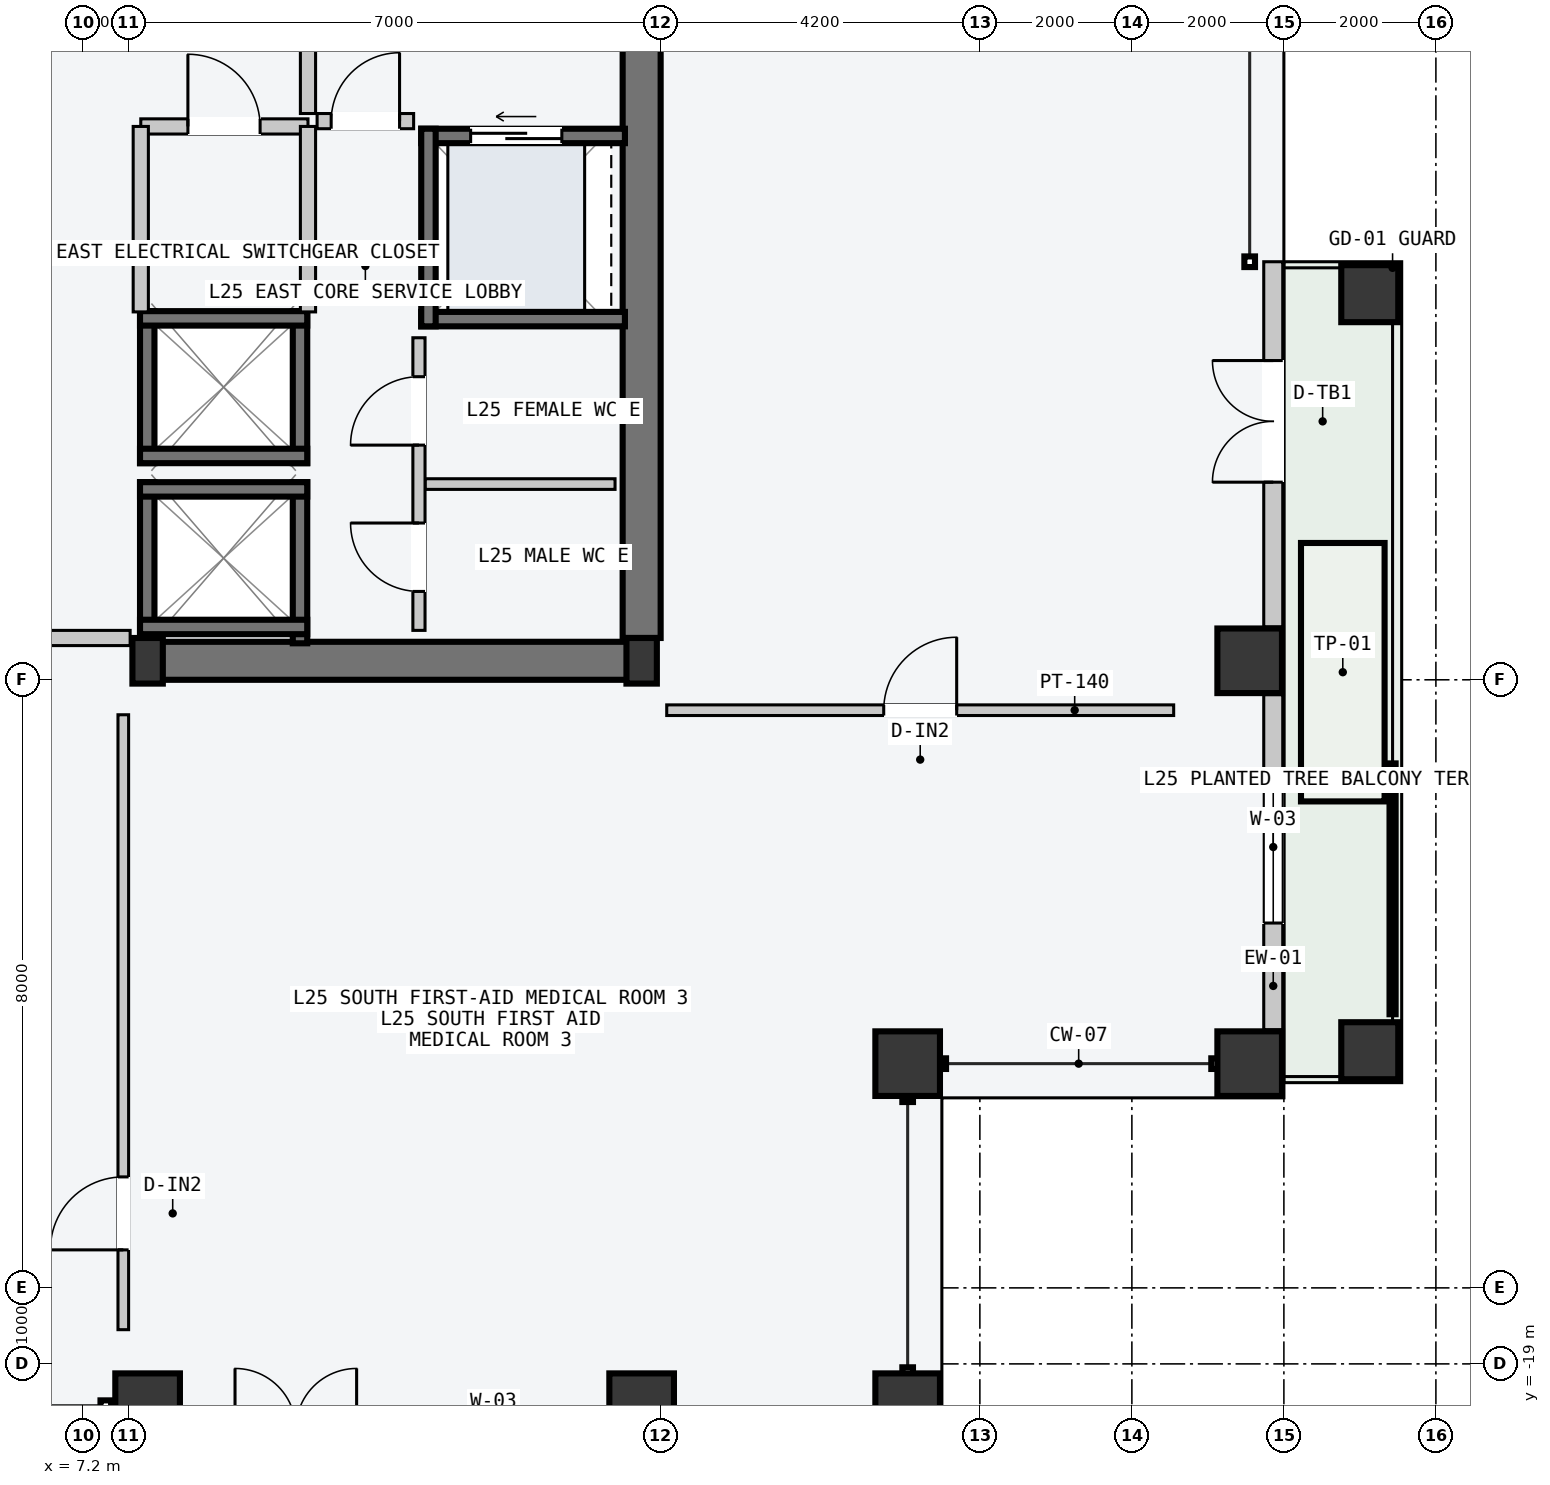
"""IFC4 building model, lengths in metres.
Left out: names, types, materials, properties, quantities, classifications, styles, units other than length and angle.
Written with IfcOpenShell. Run it as: python <this file> out.ifc"""

import sys

from ifc_helpers import new_model, si_unit, direction, frame, frame_2d, origin, origin_2d, place, context, subcontext, project, spatial, rectangle, hollow_rectangle, i_section, extrude, element, fill, save


model = new_model("IFC4")
c1 = context("Model", 3, precision=1e-05, world=origin(), true_north=direction((0.0, 1.0)))
c2 = subcontext(c1, "Body", "Model", "MODEL_VIEW")
j1 = project(units=[si_unit("LENGTHUNIT", "METRE"), si_unit("PLANEANGLEUNIT", "RADIAN")], contexts=[c1])
p1 = place(None, origin())
s1 = spatial("IfcSite", under=j1, at=p1, CompositionType="ELEMENT")
p2 = place(p1, origin())
s2 = spatial("IfcBuilding", under=s1, at=p2, CompositionType="ELEMENT")
p3 = place(p2, frame((0.0, 0.0, 99.0)))
s3 = spatial("IfcBuildingStorey", under=s2, at=p3, CompositionType="ELEMENT", Elevation=99.0)
p4 = place(p3, frame((8.07, -9.75, -0.2), z_axis=(0.0, 0.0, 1.0), x_axis=(1.0, 0.0, 0.0)))
e1 = element("IfcWall", 1, at=p4, inside=s3, PredefinedType="SHEAR", context=c2, shape_type="SweptSolid", body=[
    extrude(rectangle(XDim=6.46, YDim=0.5, at=frame_2d((3.23, 0.0))), origin(), (0.0, 0.0, 1.0), 3.6),
])
p5 = place(p3, frame((14.55, -9.45, -0.2), z_axis=(0.0, 0.0, 1.0), x_axis=(0.0, 1.0, 0.0)))
e2 = element("IfcWall", 2, at=p5, inside=s3, PredefinedType="SHEAR", context=c2, shape_type="SweptSolid", body=[
    extrude(rectangle(XDim=9.15, YDim=0.5, at=frame_2d((4.575, 0.0))), origin(), (0.0, 0.0, 1.0), 3.6),
])
for number, where, z_axis, x_axis in (
    (3, (8.05, -9.75, 0.0), (0.0, 0.0, 1.0), (1.0, 0.0, 0.0)),
    (4, (14.55, -9.75, 0.0), (0.0, 0.0, 1.0), (1.0, 0.0, 0.0)),
):
    element("IfcColumn", number, at=place(p3, frame(where, z_axis=z_axis, x_axis=x_axis)), inside=s3, PredefinedType="COLUMN", context=c2, shape_type="SweptSolid", body=[
        extrude(i_section(OverallWidth=0.4, OverallDepth=0.6, WebThickness=0.022, FlangeThickness=0.036, at=origin_2d()), origin(), (0.0, 0.0, 1.0), 3.6),
    ])
for number, where, z_axis, x_axis in (
    (5, (8.05, -19.55, 0.0), (0.0, 0.0, 1.0), (1.0, 0.0, 0.0)),
    (6, (14.55, -19.55, 0.0), (0.0, 0.0, 1.0), (1.0, 0.0, 0.0)),
    (7, (18.05, -19.55, 0.0), (0.0, 0.0, 1.0), (1.0, 0.0, 0.0)),
    (8, (22.55, -15.05, 0.0), (0.0, 0.0, 1.0), (0.0, 1.0, 0.0)),
    (9, (22.55, -9.75, 0.0), (0.0, 0.0, 1.0), (0.0, 1.0, 0.0)),
    (10, (18.05, -15.05, 0.0), (0.0, 0.0, 1.0), (1.0, 0.0, 0.0)),
):
    element("IfcColumn", number, at=place(p3, frame(where, z_axis=z_axis, x_axis=x_axis)), inside=s3, PredefinedType="COLUMN", context=c2, shape_type="SweptSolid", body=[
        extrude(hollow_rectangle(XDim=0.85, YDim=0.85, WallThickness=0.04, at=origin_2d()), origin(), (0.0, 0.0, 1.0), 3.6),
    ])
for number, where, z_axis, x_axis in (
    (11, (24.13, -14.88, 0.0), (0.0, 0.0, 1.0), (0.0, 1.0, 0.0)),
    (12, (24.13, -4.92, 0.0), (0.0, 0.0, 1.0), (0.0, 1.0, 0.0)),
):
    element("IfcColumn", number, at=place(p3, frame(where, z_axis=z_axis, x_axis=x_axis)), inside=s3, PredefinedType="COLUMN", context=c2, shape_type="SweptSolid", body=[
        extrude(hollow_rectangle(XDim=0.75, YDim=0.75, WallThickness=0.032, at=origin_2d()), origin(), (0.0, 0.0, 1.0), 3.6),
    ])
p6 = place(p3, frame((22.86, -14.605, 0.0), z_axis=(0.0, 0.0, 1.0), x_axis=(0.0, 1.0, 0.0)))
e13 = element("IfcWall", 13, at=p6, inside=s3, PredefinedType="STANDARD", context=c2, shape_type="SweptSolid", body=[
    extrude(rectangle(XDim=4.41, YDim=0.25, at=frame_2d((2.205, 0.0))), origin(), (0.0, 0.0, 1.0), 3.4),
])
p7 = place(p6, frame((1.405, 0.0, 0.85)))
e14 = element("IfcOpeningElement", 14, at=p7, cuts=e13, PredefinedType="OPENING", context=c2, shape_type="SweptSolid", body=[
    extrude(rectangle(XDim=2.0, YDim=2.1, at=frame_2d((1.0, 1.05))), frame((0.0, 0.135, 0.0), z_axis=(0.0, -1.0, 0.0), x_axis=(1.0, 0.0, 0.0)), (0.0, 0.0, 1.0), 0.27),
])
p8 = place(p3, frame((22.86, -9.305, 0.0), z_axis=(0.0, 0.0, 1.0), x_axis=(0.0, 1.0, 0.0)))
e15 = element("IfcWall", 15, at=p8, inside=s3, PredefinedType="STANDARD", context=c2, shape_type="SweptSolid", body=[
    extrude(rectangle(XDim=4.805, YDim=0.25, at=frame_2d((2.402, 0.0))), origin(), (0.0, 0.0, 1.0), 3.4),
])
p9 = place(p8, frame((1.905, 0.0, 0.0)))
e16 = element("IfcOpeningElement", 16, at=p9, cuts=e15, PredefinedType="OPENING", context=c2, shape_type="SweptSolid", body=[
    extrude(rectangle(XDim=1.6, YDim=2.2, at=frame_2d((0.8, 1.1))), frame((0.0, 0.135, 0.0), z_axis=(0.0, -1.0, 0.0), x_axis=(1.0, 0.0, 0.0)), (0.0, 0.0, 1.0), 0.27),
])
for number, where, z_axis, x_axis in (
    (17, (8.045, -9.52, -0.2), (0.0, 0.0, 1.0), (0.0, 1.0, 0.0)),
    (18, (10.055, -9.52, -0.2), (0.0, 0.0, 1.0), (0.0, 1.0, 0.0)),
):
    element("IfcWall", number, at=place(p3, frame(where, z_axis=z_axis, x_axis=x_axis)), inside=s3, PredefinedType="SOLIDWALL", context=c2, shape_type="SweptSolid", body=[
        extrude(rectangle(XDim=2.12, YDim=0.19, at=frame_2d((1.06, 0.0))), origin(), (0.0, 0.0, 1.0), 3.6),
    ])
for number, where, z_axis, x_axis in (
    (19, (7.95, -7.495, -0.2), (0.0, 0.0, 1.0), (1.0, 0.0, 0.0)),
    (20, (7.95, -9.305, -0.2), (0.0, 0.0, 1.0), (1.0, 0.0, 0.0)),
):
    element("IfcWall", number, at=place(p3, frame(where, z_axis=z_axis, x_axis=x_axis)), inside=s3, PredefinedType="SOLIDWALL", context=c2, shape_type="SweptSolid", body=[
        extrude(rectangle(XDim=2.2, YDim=0.19, at=frame_2d((1.1, 0.0))), origin(), (0.0, 0.0, 1.0), 3.6),
    ])
for number, where, z_axis, x_axis in (
    (21, (8.045, -7.15, -0.2), (0.0, 0.0, 1.0), (0.0, 1.0, 0.0)),
    (22, (10.055, -7.15, -0.2), (0.0, 0.0, 1.0), (0.0, 1.0, 0.0)),
):
    element("IfcWall", number, at=place(p3, frame(where, z_axis=z_axis, x_axis=x_axis)), inside=s3, PredefinedType="SOLIDWALL", context=c2, shape_type="SweptSolid", body=[
        extrude(rectangle(XDim=2.0, YDim=0.19, at=frame_2d((1.0, 0.0))), origin(), (0.0, 0.0, 1.0), 3.6),
    ])
for number, where, z_axis, x_axis in (
    (23, (7.95, -5.245, -0.2), (0.0, 0.0, 1.0), (1.0, 0.0, 0.0)),
    (24, (7.95, -7.055, -0.2), (0.0, 0.0, 1.0), (1.0, 0.0, 0.0)),
):
    element("IfcWall", number, at=place(p3, frame(where, z_axis=z_axis, x_axis=x_axis)), inside=s3, PredefinedType="SOLIDWALL", context=c2, shape_type="SweptSolid", body=[
        extrude(rectangle(XDim=2.2, YDim=0.19, at=frame_2d((1.1, 0.0))), origin(), (0.0, 0.0, 1.0), 3.6),
    ])
p10 = place(p3, frame((11.65, -2.845, -0.2), z_axis=(0.0, 0.0, 1.0), x_axis=(1.0, 0.0, 0.0)))
e25 = element("IfcWall", 25, at=p10, inside=s3, PredefinedType="SOLIDWALL", context=c2, shape_type="SweptSolid", body=[
    extrude(rectangle(XDim=2.68, YDim=0.19, at=frame_2d((1.34, 0.0))), origin(), (0.0, 0.0, 1.0), 3.6),
])
p11 = place(p10, frame((0.65, 0.0, 0.2)))
e26 = element("IfcOpeningElement", 26, at=p11, cuts=e25, PredefinedType="OPENING", context=c2, shape_type="SweptSolid", body=[
    extrude(rectangle(XDim=1.2, YDim=2.2, at=frame_2d((0.6, 1.1))), frame((0.0, 0.105, 0.0), z_axis=(0.0, -1.0, 0.0), x_axis=(1.0, 0.0, 0.0)), (0.0, 0.0, 1.0), 0.21),
])
p12 = place(p3, frame((11.65, -5.255, -0.2), z_axis=(0.0, 0.0, 1.0), x_axis=(1.0, 0.0, 0.0)))
e27 = element("IfcWall", 27, at=p12, inside=s3, PredefinedType="SOLIDWALL", context=c2, shape_type="SweptSolid", body=[
    extrude(rectangle(XDim=2.68, YDim=0.19, at=frame_2d((1.34, 0.0))), origin(), (0.0, 0.0, 1.0), 3.6),
])
p13 = place(p3, frame((11.745, -5.35, -0.2), z_axis=(0.0, 0.0, 1.0), x_axis=(0.0, 1.0, 0.0)))
e28 = element("IfcWall", 28, at=p13, inside=s3, PredefinedType="SOLIDWALL", context=c2, shape_type="SweptSolid", body=[
    extrude(rectangle(XDim=2.6, YDim=0.19, at=frame_2d((1.3, 0.0))), origin(), (0.0, 0.0, 1.0), 3.6),
])
p14 = place(p3, frame((6.02, -9.45, 0.0), z_axis=(0.0, 0.0, 1.0), x_axis=(1.0, 0.0, 0.0)))
e29 = element("IfcWall", 29, at=p14, inside=s3, PredefinedType="PARTITIONING", context=c2, shape_type="SweptSolid", body=[
    extrude(rectangle(XDim=1.8, YDim=0.2, at=frame_2d((0.9, 0.0))), origin(), (0.0, 0.0, 1.0), 3.4),
])
p15 = place(p3, frame((10.16, -2.55, 0.0), z_axis=(0.0, 0.0, 1.0), x_axis=(0.0, 1.0, 0.0)))
e30 = element("IfcWall", 30, at=p15, inside=s3, PredefinedType="PARTITIONING", context=c2, shape_type="SweptSolid", body=[
    extrude(rectangle(XDim=3.4, YDim=0.2, at=frame_2d((1.7, 0.0))), origin(), (0.0, 0.0, 1.0), 3.4),
])
p16 = place(p15, frame((1.3, 0.0, 0.0)))
e31 = element("IfcOpeningElement", 31, at=p16, cuts=e30, PredefinedType="OPENING", context=c2, shape_type="SweptSolid", body=[
    extrude(rectangle(XDim=1.1, YDim=2.15, at=frame_2d((0.55, 1.075))), frame((0.0, 0.11, 0.0), z_axis=(0.0, -1.0, 0.0), x_axis=(1.0, 0.0, 0.0)), (0.0, 0.0, 1.0), 0.22),
])
p17 = place(p3, frame((10.28, -2.65, 0.0), z_axis=(0.0, 0.0, 1.0), x_axis=(1.0, 0.0, 0.0)))
e32 = element("IfcWall", 32, at=p17, inside=s3, PredefinedType="PARTITIONING", context=c2, shape_type="SweptSolid", body=[
    extrude(rectangle(XDim=1.27, YDim=0.2, at=frame_2d((0.635, 0.0))), origin(), (0.0, 0.0, 1.0), 3.4),
])
p18 = place(p17, frame((0.185, 0.0, 0.0)))
e33 = element("IfcOpeningElement", 33, at=p18, cuts=e32, PredefinedType="OPENING", context=c2, shape_type="SweptSolid", body=[
    extrude(rectangle(XDim=0.9, YDim=2.15, at=frame_2d((0.45, 1.075))), frame((0.0, 0.11, 0.0), z_axis=(0.0, -1.0, 0.0), x_axis=(1.0, 0.0, 0.0)), (0.0, 0.0, 1.0), 0.22),
])
p19 = place(p3, frame((7.96, -2.72, 0.0), z_axis=(0.0, 0.0, 1.0), x_axis=(1.0, 0.0, 0.0)))
e34 = element("IfcWall", 34, at=p19, inside=s3, PredefinedType="PARTITIONING", context=c2, shape_type="SweptSolid", body=[
    extrude(rectangle(XDim=2.2, YDim=0.2, at=frame_2d((1.1, 0.0))), origin(), (0.0, 0.0, 1.0), 3.4),
])
p20 = place(p19, frame((0.62, 0.0, 0.0)))
e35 = element("IfcOpeningElement", 35, at=p20, cuts=e34, PredefinedType="OPENING", context=c2, shape_type="SweptSolid", body=[
    extrude(rectangle(XDim=0.95, YDim=2.1, at=frame_2d((0.475, 1.05))), frame((0.0, 0.11, 0.0), z_axis=(0.0, -1.0, 0.0), x_axis=(1.0, 0.0, 0.0)), (0.0, 0.0, 1.0), 0.22),
])
for number, where, z_axis, x_axis in (
    (36, (7.96, -5.16, 0.0), (0.0, 0.0, 1.0), (0.0, 1.0, 0.0)),
    (37, (10.16, -5.16, 0.0), (0.0, 0.0, 1.0), (0.0, 1.0, 0.0)),
):
    element("IfcWall", number, at=place(p3, frame(where, z_axis=z_axis, x_axis=x_axis)), inside=s3, PredefinedType="PARTITIONING", context=c2, shape_type="SweptSolid", body=[
        extrude(rectangle(XDim=2.44, YDim=0.2, at=frame_2d((1.22, 0.0))), origin(), (0.0, 0.0, 1.0), 3.4),
    ])
p21 = place(p3, frame((11.7, -7.425, 0.0), z_axis=(0.0, 0.0, 1.0), x_axis=(1.0, 0.0, 0.0)))
e38 = element("IfcWall", 38, at=p21, inside=s3, PredefinedType="PARTITIONING", context=c2, shape_type="SweptSolid", body=[
    extrude(rectangle(XDim=2.5, YDim=0.14, at=frame_2d((1.25, 0.0))), origin(), (0.0, 0.0, 1.0), 3.4),
])
p22 = place(p3, frame((11.62, -9.35, 0.0), z_axis=(0.0, 0.0, 1.0), x_axis=(0.0, 1.0, 0.0)))
e39 = element("IfcWall", 39, at=p22, inside=s3, PredefinedType="PARTITIONING", context=c2, shape_type="SweptSolid", body=[
    extrude(rectangle(XDim=3.85, YDim=0.16, at=frame_2d((1.925, 0.0))), origin(), (0.0, 0.0, 1.0), 3.4),
])
p23 = place(p22, frame((0.512, 0.0, 0.0)))
e40 = element("IfcOpeningElement", 40, at=p23, cuts=e39, PredefinedType="OPENING", context=c2, shape_type="SweptSolid", body=[
    extrude(rectangle(XDim=0.9, YDim=2.15, at=frame_2d((0.45, 1.075))), frame((0.0, 0.09, 0.0), z_axis=(0.0, -1.0, 0.0), x_axis=(1.0, 0.0, 0.0)), (0.0, 0.0, 1.0), 0.18),
])
p24 = place(p22, frame((2.438, 0.0, 0.0)))
e41 = element("IfcOpeningElement", 41, at=p24, cuts=e39, PredefinedType="OPENING", context=c2, shape_type="SweptSolid", body=[
    extrude(rectangle(XDim=0.9, YDim=2.15, at=frame_2d((0.45, 1.075))), frame((0.0, 0.09, 0.0), z_axis=(0.0, -1.0, 0.0), x_axis=(1.0, 0.0, 0.0)), (0.0, 0.0, 1.0), 0.18),
])
p25 = place(p3, frame((7.73, -18.55, 0.0), z_axis=(0.0, 0.0, 1.0), x_axis=(0.0, 1.0, 0.0)))
e42 = element("IfcWall", 42, at=p25, inside=s3, PredefinedType="PARTITIONING", context=c2, shape_type="SweptSolid", body=[
    extrude(rectangle(XDim=8.09, YDim=0.14, at=frame_2d((4.045, 0.0))), origin(), (0.0, 0.0, 1.0), 3.4),
])
p26 = place(p25, frame((1.05, 0.0, 0.0)))
e43 = element("IfcOpeningElement", 43, at=p26, cuts=e42, PredefinedType="OPENING", context=c2, shape_type="SweptSolid", body=[
    extrude(rectangle(XDim=0.96, YDim=2.18, at=frame_2d((0.48, 1.09))), frame((0.0, 0.08, 0.0), z_axis=(0.0, -1.0, 0.0), x_axis=(1.0, 0.0, 0.0)), (0.0, 0.0, 1.0), 0.16),
])
p27 = place(p3, frame((14.88, -10.4, 0.0), z_axis=(0.0, 0.0, 1.0), x_axis=(1.0, 0.0, 0.0)))
e44 = element("IfcWall", 44, at=p27, inside=s3, PredefinedType="PARTITIONING", context=c2, shape_type="SweptSolid", body=[
    extrude(rectangle(XDim=6.67, YDim=0.14, at=frame_2d((3.335, 0.0))), origin(), (0.0, 0.0, 1.0), 3.4),
])
p28 = place(p27, frame((2.855, 0.0, 0.0)))
e45 = element("IfcOpeningElement", 45, at=p28, cuts=e44, PredefinedType="OPENING", context=c2, shape_type="SweptSolid", body=[
    extrude(rectangle(XDim=0.96, YDim=2.18, at=frame_2d((0.48, 1.09))), frame((0.0, 0.08, 0.0), z_axis=(0.0, -1.0, 0.0), x_axis=(1.0, 0.0, 0.0)), (0.0, 0.0, 1.0), 0.16),
])
p29 = place(p7, origin())
e46 = element("IfcWindow", 46, at=p29, inside=s3, PartitioningType="SINGLE_PANEL", PredefinedType="WINDOW", context=c2, shape_type="SweptSolid", body=[
    extrude(rectangle(XDim=2.0, YDim=2.1, at=frame_2d((1.0, 1.05))), frame((0.0, 0.03, 0.0), z_axis=(0.0, -1.0, 0.0), x_axis=(1.0, 0.0, 0.0)), (0.0, 0.0, 1.0), 0.06),
])
fill(e14, e46)
p30 = place(p9, origin())
e47 = element("IfcDoor", 47, at=p30, inside=s3, OperationType="DOUBLE_DOOR_SINGLE_SWING", PredefinedType="DOOR", context=c2, shape_type="SweptSolid", body=[
    extrude(rectangle(XDim=1.6, YDim=2.2, at=frame_2d((0.8, 1.1))), frame((0.0, 0.025, 0.0), z_axis=(0.0, -1.0, 0.0), x_axis=(1.0, 0.0, 0.0)), (0.0, 0.0, 1.0), 0.05),
])
fill(e16, e47)
p31 = place(p11, origin())
e48 = element("IfcDoor", 48, at=p31, inside=s3, OperationType="SLIDING_TO_LEFT", PredefinedType="DOOR", context=c2, shape_type="SweptSolid", body=[
    extrude(rectangle(XDim=1.2, YDim=2.2, at=frame_2d((0.6, 1.1))), frame((0.0, 0.025, 0.0), z_axis=(0.0, -1.0, 0.0), x_axis=(1.0, 0.0, 0.0)), (0.0, 0.0, 1.0), 0.05),
])
fill(e26, e48)
p32 = place(p18, origin())
e49 = element("IfcDoor", 49, at=p32, inside=s3, OperationType="SINGLE_SWING_RIGHT", PredefinedType="DOOR", context=c2, shape_type="SweptSolid", body=[
    extrude(rectangle(XDim=0.9, YDim=2.15, at=frame_2d((0.45, 1.075))), frame((0.0, 0.025, 0.0), z_axis=(0.0, -1.0, 0.0), x_axis=(1.0, 0.0, 0.0)), (0.0, 0.0, 1.0), 0.05),
])
fill(e33, e49)
p33 = place(p20, origin())
e50 = element("IfcDoor", 50, at=p33, inside=s3, OperationType="SINGLE_SWING_LEFT", PredefinedType="DOOR", context=c2, shape_type="SweptSolid", body=[
    extrude(rectangle(XDim=0.95, YDim=2.1, at=frame_2d((0.475, 1.05))), frame((0.0, 0.025, 0.0), z_axis=(0.0, -1.0, 0.0), x_axis=(1.0, 0.0, 0.0)), (0.0, 0.0, 1.0), 0.05),
])
fill(e35, e50)
p34 = place(p23, origin())
e51 = element("IfcDoor", 51, at=p34, inside=s3, OperationType="SINGLE_SWING_RIGHT", PredefinedType="DOOR", context=c2, shape_type="SweptSolid", body=[
    extrude(rectangle(XDim=0.9, YDim=2.15, at=frame_2d((0.45, 1.075))), frame((0.0, 0.025, 0.0), z_axis=(0.0, -1.0, 0.0), x_axis=(1.0, 0.0, 0.0)), (0.0, 0.0, 1.0), 0.05),
])
fill(e40, e51)
p35 = place(p24, origin())
e52 = element("IfcDoor", 52, at=p35, inside=s3, OperationType="SINGLE_SWING_LEFT", PredefinedType="DOOR", context=c2, shape_type="SweptSolid", body=[
    extrude(rectangle(XDim=0.9, YDim=2.15, at=frame_2d((0.45, 1.075))), frame((0.0, 0.025, 0.0), z_axis=(0.0, -1.0, 0.0), x_axis=(1.0, 0.0, 0.0)), (0.0, 0.0, 1.0), 0.05),
])
fill(e41, e52)
p36 = place(p26, origin())
e53 = element("IfcDoor", 53, at=p36, inside=s3, OperationType="SINGLE_SWING_LEFT", PredefinedType="DOOR", context=c2, shape_type="SweptSolid", body=[
    extrude(rectangle(XDim=0.96, YDim=2.18, at=frame_2d((0.48, 1.09))), frame((0.0, 0.025, 0.0), z_axis=(0.0, -1.0, 0.0), x_axis=(1.0, 0.0, 0.0)), (0.0, 0.0, 1.0), 0.05),
])
fill(e43, e53)
p37 = place(p28, origin())
e54 = element("IfcDoor", 54, at=p37, inside=s3, OperationType="SINGLE_SWING_RIGHT", PredefinedType="DOOR", context=c2, shape_type="SweptSolid", body=[
    extrude(rectangle(XDim=0.96, YDim=2.18, at=frame_2d((0.48, 1.09))), frame((0.0, 0.025, 0.0), z_axis=(0.0, -1.0, 0.0), x_axis=(1.0, 0.0, 0.0)), (0.0, 0.0, 1.0), 0.05),
])
fill(e45, e54)
save(model, sys.argv[1])
